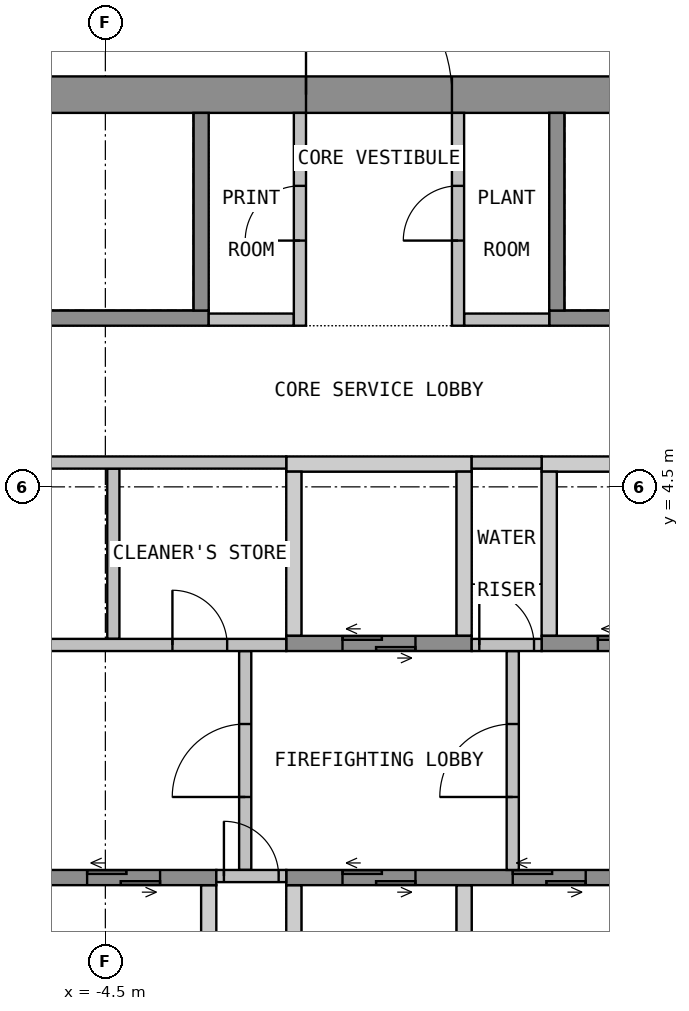
"""IFC4 building model, lengths in metres.
Left out: names, types, materials, properties, quantities, classifications, styles, units other than length and angle.
Written with IfcOpenShell. Run it as: python <this file> out.ifc"""

import sys

from ifc_helpers import new_model, si_unit, direction, frame, frame_2d, origin, place, context, subcontext, project, spatial, polyline, rectangle, outline, extrude, element, fill, save


model = new_model("IFC4")
c1 = context("Model", 3, precision=1e-05, world=origin(), true_north=direction((0.0, 1.0)))
c2 = subcontext(c1, "Body", "Model", "MODEL_VIEW")
j1 = project(units=[si_unit("LENGTHUNIT", "METRE"), si_unit("PLANEANGLEUNIT", "RADIAN")], contexts=[c1])
p1 = place(None, origin())
s1 = spatial("IfcSite", under=j1, at=p1, CompositionType="ELEMENT")
p2 = place(p1, origin())
s2 = spatial("IfcBuilding", under=s1, at=p2, CompositionType="ELEMENT")
p3 = place(p2, frame((0.0, 0.0, 246.9)))
s3 = spatial("IfcBuildingStorey", under=s2, at=p3, CompositionType="ELEMENT", Elevation=246.9)
p4 = place(p3, frame((-13.5, 10.95, 0.0), z_axis=(0.0, 0.0, 1.0), x_axis=(1.0, 0.0, 0.0)))
e1 = element("IfcWall", 1, at=p4, inside=s3, PredefinedType="SHEAR", context=c2, shape_type="SweptSolid", body=[
    extrude(rectangle(XDim=27.0, YDim=0.6, at=frame_2d((13.5, 0.0))), origin(), (0.0, 0.0, 1.0), 3.575),
])
p5 = place(p4, frame((12.3, 0.0, 0.0)))
e2 = element("IfcOpeningElement", 2, at=p5, cuts=e1, PredefinedType="OPENING", context=c2, shape_type="SweptSolid", body=[
    extrude(rectangle(XDim=2.4, YDim=2.1, at=frame_2d((1.2, 1.05))), frame((0.0, 0.31, 0.0), z_axis=(0.0, -1.0, 0.0), x_axis=(1.0, 0.0, 0.0)), (0.0, 0.0, 1.0), 0.62),
])
p6 = place(p4, frame((1.05, 0.0, 0.0)))
e3 = element("IfcOpeningElement", 3, at=p6, cuts=e1, PredefinedType="OPENING", context=c2, shape_type="SweptSolid", body=[
    extrude(rectangle(XDim=1.2, YDim=2.1, at=frame_2d((0.6, 1.05))), frame((0.0, 0.31, 0.0), z_axis=(0.0, -1.0, 0.0), x_axis=(1.0, 0.0, 0.0)), (0.0, 0.0, 1.0), 0.62),
])
p7 = place(p4, frame((24.75, 0.0, 0.0)))
e4 = element("IfcOpeningElement", 4, at=p7, cuts=e1, PredefinedType="OPENING", context=c2, shape_type="SweptSolid", body=[
    extrude(rectangle(XDim=1.2, YDim=2.1, at=frame_2d((0.6, 1.05))), frame((0.0, 0.31, 0.0), z_axis=(0.0, -1.0, 0.0), x_axis=(1.0, 0.0, 0.0)), (0.0, 0.0, 1.0), 0.62),
])
p8 = place(p3, origin())
e5 = element("IfcWall", 5, at=p8, inside=s3, PredefinedType="SHEAR", context=c2, shape_type="SweptSolid", body=[
    extrude(outline(polyline([(-1.525, 4.75), (1.525, 4.75), (1.525, 5.0), (-1.525, 5.0), (-1.525, 4.75)])), origin(), (0.0, 0.0, 1.0), 3.575),
])
p9 = place(p3, origin())
e6 = element("IfcWall", 6, at=p9, inside=s3, PredefinedType="SHEAR", context=c2, shape_type="SweptSolid", body=[
    extrude(outline(polyline([(2.675, 4.75), (8.525, 4.75), (8.525, 5.0), (2.675, 5.0), (2.675, 4.75)])), origin(), (0.0, 0.0, 1.0), 3.575),
])
p10 = place(p3, origin())
e7 = element("IfcWall", 7, at=p10, inside=s3, PredefinedType="SHEAR", context=c2, shape_type="SweptSolid", body=[
    extrude(outline(polyline([(-1.525, 2.05), (-1.275, 2.05), (-1.275, 4.75), (-1.525, 4.75), (-1.525, 2.05)])), origin(), (0.0, 0.0, 1.0), 3.575),
])
p11 = place(p3, origin())
e8 = element("IfcWall", 8, at=p11, inside=s3, PredefinedType="SHEAR", context=c2, shape_type="SweptSolid", body=[
    extrude(outline(polyline([(1.275, 2.05), (1.525, 2.05), (1.525, 4.75), (1.275, 4.75), (1.275, 2.05)])), origin(), (0.0, 0.0, 1.0), 3.575),
])
p12 = place(p3, origin())
e9 = element("IfcWall", 9, at=p12, inside=s3, PredefinedType="SHEAR", context=c2, shape_type="SweptSolid", body=[
    extrude(outline(polyline([(2.675, 2.05), (2.925, 2.05), (2.925, 4.75), (2.675, 4.75), (2.675, 2.05)])), origin(), (0.0, 0.0, 1.0), 3.575),
])
p13 = place(p3, frame((-1.525, 1.925, 0.0), z_axis=(0.0, 0.0, 1.0), x_axis=(1.0, 0.0, 0.0)))
e10 = element("IfcWall", 10, at=p13, inside=s3, PredefinedType="SHEAR", context=c2, shape_type="SweptSolid", body=[
    extrude(rectangle(XDim=3.05, YDim=0.25, at=frame_2d((1.525, 0.0))), origin(), (0.0, 0.0, 1.0), 3.575),
])
p14 = place(p13, frame((0.925, 0.0, 0.0)))
e11 = element("IfcOpeningElement", 11, at=p14, cuts=e10, PredefinedType="OPENING", context=c2, shape_type="SweptSolid", body=[
    extrude(rectangle(XDim=1.2, YDim=2.1, at=frame_2d((0.6, 1.05))), frame((0.0, 0.135, 0.0), z_axis=(0.0, -1.0, 0.0), x_axis=(1.0, 0.0, 0.0)), (0.0, 0.0, 1.0), 0.27),
])
p15 = place(p3, frame((2.675, 1.925, 0.0), z_axis=(0.0, 0.0, 1.0), x_axis=(1.0, 0.0, 0.0)))
e12 = element("IfcWall", 12, at=p15, inside=s3, PredefinedType="SHEAR", context=c2, shape_type="SweptSolid", body=[
    extrude(rectangle(XDim=5.85, YDim=0.25, at=frame_2d((2.925, 0.0))), origin(), (0.0, 0.0, 1.0), 3.575),
])
p16 = place(p15, frame((0.925, 0.0, 0.0)))
e13 = element("IfcOpeningElement", 13, at=p16, cuts=e12, PredefinedType="OPENING", context=c2, shape_type="SweptSolid", body=[
    extrude(rectangle(XDim=1.2, YDim=2.1, at=frame_2d((0.6, 1.05))), frame((0.0, 0.135, 0.0), z_axis=(0.0, -1.0, 0.0), x_axis=(1.0, 0.0, 0.0)), (0.0, 0.0, 1.0), 0.27),
])
p17 = place(p15, frame((3.725, 0.0, 0.0)))
e14 = element("IfcOpeningElement", 14, at=p17, cuts=e12, PredefinedType="OPENING", context=c2, shape_type="SweptSolid", body=[
    extrude(rectangle(XDim=1.2, YDim=2.1, at=frame_2d((0.6, 1.05))), frame((0.0, 0.135, 0.0), z_axis=(0.0, -1.0, 0.0), x_axis=(1.0, 0.0, 0.0)), (0.0, 0.0, 1.0), 0.27),
])
p18 = place(p3, origin())
e15 = element("IfcWall", 15, at=p18, inside=s3, PredefinedType="SHEAR", context=c2, shape_type="SweptSolid", body=[
    extrude(outline(polyline([(-2.925, -4.75), (-2.675, -4.75), (-2.675, -2.05), (-2.925, -2.05), (-2.925, -4.75)])), origin(), (0.0, 0.0, 1.0), 3.575),
])
p19 = place(p3, origin())
e16 = element("IfcWall", 16, at=p19, inside=s3, PredefinedType="SHEAR", context=c2, shape_type="SweptSolid", body=[
    extrude(outline(polyline([(-1.525, -4.75), (-1.275, -4.75), (-1.275, -2.05), (-1.525, -2.05), (-1.525, -4.75)])), origin(), (0.0, 0.0, 1.0), 3.575),
])
p20 = place(p3, origin())
e17 = element("IfcWall", 17, at=p20, inside=s3, PredefinedType="SHEAR", context=c2, shape_type="SweptSolid", body=[
    extrude(outline(polyline([(1.275, -4.75), (1.525, -4.75), (1.525, -2.05), (1.275, -2.05), (1.275, -4.75)])), origin(), (0.0, 0.0, 1.0), 3.575),
])
p21 = place(p3, frame((-11.325, -1.925, 0.0), z_axis=(0.0, 0.0, 1.0), x_axis=(1.0, 0.0, 0.0)))
e18 = element("IfcWall", 18, at=p21, inside=s3, PredefinedType="SHEAR", context=c2, shape_type="SweptSolid", body=[
    extrude(rectangle(XDim=8.65, YDim=0.25, at=frame_2d((4.325, 0.0))), origin(), (0.0, 0.0, 1.0), 3.575),
])
p22 = place(p21, frame((0.925, 0.0, 0.0)))
e19 = element("IfcOpeningElement", 19, at=p22, cuts=e18, PredefinedType="OPENING", context=c2, shape_type="SweptSolid", body=[
    extrude(rectangle(XDim=1.2, YDim=2.1, at=frame_2d((0.6, 1.05))), frame((0.0, 0.135, 0.0), z_axis=(0.0, -1.0, 0.0), x_axis=(1.0, 0.0, 0.0)), (0.0, 0.0, 1.0), 0.27),
])
p23 = place(p21, frame((3.725, 0.0, 0.0)))
e20 = element("IfcOpeningElement", 20, at=p23, cuts=e18, PredefinedType="OPENING", context=c2, shape_type="SweptSolid", body=[
    extrude(rectangle(XDim=1.2, YDim=2.1, at=frame_2d((0.6, 1.05))), frame((0.0, 0.135, 0.0), z_axis=(0.0, -1.0, 0.0), x_axis=(1.0, 0.0, 0.0)), (0.0, 0.0, 1.0), 0.27),
])
p24 = place(p21, frame((6.525, 0.0, 0.0)))
e21 = element("IfcOpeningElement", 21, at=p24, cuts=e18, PredefinedType="OPENING", context=c2, shape_type="SweptSolid", body=[
    extrude(rectangle(XDim=1.2, YDim=2.1, at=frame_2d((0.6, 1.05))), frame((0.0, 0.135, 0.0), z_axis=(0.0, -1.0, 0.0), x_axis=(1.0, 0.0, 0.0)), (0.0, 0.0, 1.0), 0.27),
])
p25 = place(p3, frame((-1.525, -1.925, 0.0), z_axis=(0.0, 0.0, 1.0), x_axis=(1.0, 0.0, 0.0)))
e22 = element("IfcWall", 22, at=p25, inside=s3, PredefinedType="SHEAR", context=c2, shape_type="SweptSolid", body=[
    extrude(rectangle(XDim=5.85, YDim=0.25, at=frame_2d((2.925, 0.0))), origin(), (0.0, 0.0, 1.0), 3.575),
])
p26 = place(p25, frame((0.925, 0.0, 0.0)))
e23 = element("IfcOpeningElement", 23, at=p26, cuts=e22, PredefinedType="OPENING", context=c2, shape_type="SweptSolid", body=[
    extrude(rectangle(XDim=1.2, YDim=2.1, at=frame_2d((0.6, 1.05))), frame((0.0, 0.135, 0.0), z_axis=(0.0, -1.0, 0.0), x_axis=(1.0, 0.0, 0.0)), (0.0, 0.0, 1.0), 0.27),
])
p27 = place(p25, frame((3.725, 0.0, 0.0)))
e24 = element("IfcOpeningElement", 24, at=p27, cuts=e22, PredefinedType="OPENING", context=c2, shape_type="SweptSolid", body=[
    extrude(rectangle(XDim=1.2, YDim=2.1, at=frame_2d((0.6, 1.05))), frame((0.0, 0.135, 0.0), z_axis=(0.0, -1.0, 0.0), x_axis=(1.0, 0.0, 0.0)), (0.0, 0.0, 1.0), 0.27),
])
p28 = place(p3, frame((-2.2, -1.8, 0.0), z_axis=(0.0, 0.0, 1.0), x_axis=(0.0, 1.0, 0.0)))
e25 = element("IfcWall", 25, at=p28, inside=s3, PredefinedType="PARTITIONING", context=c2, shape_type="SweptSolid", body=[
    extrude(rectangle(XDim=3.6, YDim=0.2, at=frame_2d((1.8, 0.0))), origin(), (0.0, 0.0, 1.0), 3.575),
])
p29 = place(p28, frame((1.2, 0.0, 0.0)))
e26 = element("IfcOpeningElement", 26, at=p29, cuts=e25, PredefinedType="OPENING", context=c2, shape_type="SweptSolid", body=[
    extrude(rectangle(XDim=1.2, YDim=2.1, at=frame_2d((0.6, 1.05))), frame((0.0, 0.11, 0.0), z_axis=(0.0, -1.0, 0.0), x_axis=(1.0, 0.0, 0.0)), (0.0, 0.0, 1.0), 0.22),
])
p30 = place(p3, frame((2.2, -1.8, 0.0), z_axis=(0.0, 0.0, 1.0), x_axis=(0.0, 1.0, 0.0)))
e27 = element("IfcWall", 27, at=p30, inside=s3, PredefinedType="PARTITIONING", context=c2, shape_type="SweptSolid", body=[
    extrude(rectangle(XDim=3.6, YDim=0.2, at=frame_2d((1.8, 0.0))), origin(), (0.0, 0.0, 1.0), 3.575),
])
p31 = place(p30, frame((1.2, 0.0, 0.0)))
e28 = element("IfcOpeningElement", 28, at=p31, cuts=e27, PredefinedType="OPENING", context=c2, shape_type="SweptSolid", body=[
    extrude(rectangle(XDim=1.2, YDim=2.1, at=frame_2d((0.6, 1.05))), frame((0.0, 0.11, 0.0), z_axis=(0.0, -1.0, 0.0), x_axis=(1.0, 0.0, 0.0)), (0.0, 0.0, 1.0), 0.22),
])
p32 = place(p3, frame((-12.9, 7.275, 0.0), z_axis=(0.0, 0.0, 1.0), x_axis=(1.0, 0.0, 0.0)))
e29 = element("IfcWall", 29, at=p32, inside=s3, PredefinedType="SHEAR", context=c2, shape_type="SweptSolid", body=[
    extrude(rectangle(XDim=10.1, YDim=0.25, at=frame_2d((5.05, 0.0))), origin(), (0.0, 0.0, 1.0), 3.575),
])
p33 = place(p32, frame((0.45, 0.0, 0.0)))
e30 = element("IfcOpeningElement", 30, at=p33, cuts=e29, PredefinedType="OPENING", context=c2, shape_type="SweptSolid", body=[
    extrude(rectangle(XDim=1.2, YDim=2.1, at=frame_2d((0.6, 1.05))), frame((0.0, 0.135, 0.0), z_axis=(0.0, -1.0, 0.0), x_axis=(1.0, 0.0, 0.0)), (0.0, 0.0, 1.0), 0.27),
])
p34 = place(p3, frame((-2.925, 7.4, 0.0), z_axis=(0.0, 0.0, 1.0), x_axis=(0.0, 1.0, 0.0)))
e31 = element("IfcWall", 31, at=p34, inside=s3, PredefinedType="SHEAR", context=c2, shape_type="SweptSolid", body=[
    extrude(rectangle(XDim=3.25, YDim=0.25, at=frame_2d((1.625, 0.0))), origin(), (0.0, 0.0, 1.0), 3.575),
])
p35 = place(p3, frame((2.8, 7.275, 0.0), z_axis=(0.0, 0.0, 1.0), x_axis=(1.0, 0.0, 0.0)))
e32 = element("IfcWall", 32, at=p35, inside=s3, PredefinedType="SHEAR", context=c2, shape_type="SweptSolid", body=[
    extrude(rectangle(XDim=10.1, YDim=0.25, at=frame_2d((5.05, 0.0))), origin(), (0.0, 0.0, 1.0), 3.575),
])
p36 = place(p35, frame((8.45, 0.0, 0.0)))
e33 = element("IfcOpeningElement", 33, at=p36, cuts=e32, PredefinedType="OPENING", context=c2, shape_type="SweptSolid", body=[
    extrude(rectangle(XDim=1.2, YDim=2.1, at=frame_2d((0.6, 1.05))), frame((0.0, 0.135, 0.0), z_axis=(0.0, -1.0, 0.0), x_axis=(1.0, 0.0, 0.0)), (0.0, 0.0, 1.0), 0.27),
])
p37 = place(p3, frame((2.925, 7.4, 0.0), z_axis=(0.0, 0.0, 1.0), x_axis=(0.0, 1.0, 0.0)))
e34 = element("IfcWall", 34, at=p37, inside=s3, PredefinedType="SHEAR", context=c2, shape_type="SweptSolid", body=[
    extrude(rectangle(XDim=3.25, YDim=0.25, at=frame_2d((1.625, 0.0))), origin(), (0.0, 0.0, 1.0), 3.575),
])
for number, where, z_axis, x_axis in (
    (35, (-2.8, 7.25, 0.0), (0.0, 0.0, 1.0), (1.0, 0.0, 0.0)),
    (36, (1.4, 7.25, 0.0), (0.0, 0.0, 1.0), (1.0, 0.0, 0.0)),
):
    element("IfcWall", number, at=place(p3, frame(where, z_axis=z_axis, x_axis=x_axis)), inside=s3, PredefinedType="PARTITIONING", context=c2, shape_type="SweptSolid", body=[
        extrude(rectangle(XDim=1.4, YDim=0.2, at=frame_2d((0.7, 0.0))), origin(), (0.0, 0.0, 1.0), 3.575),
    ])
p38 = place(p3, frame((-1.3, 7.15, 0.0), z_axis=(0.0, 0.0, 1.0), x_axis=(0.0, 1.0, 0.0)))
e37 = element("IfcWall", 37, at=p38, inside=s3, PredefinedType="PARTITIONING", context=c2, shape_type="SweptSolid", body=[
    extrude(rectangle(XDim=3.5, YDim=0.2, at=frame_2d((1.75, 0.0))), origin(), (0.0, 0.0, 1.0), 3.575),
])
p39 = place(p38, frame((1.4, 0.0, 0.0)))
e38 = element("IfcOpeningElement", 38, at=p39, cuts=e37, PredefinedType="OPENING", context=c2, shape_type="SweptSolid", body=[
    extrude(rectangle(XDim=0.9, YDim=2.1, at=frame_2d((0.45, 1.05))), frame((0.0, 0.11, 0.0), z_axis=(0.0, -1.0, 0.0), x_axis=(1.0, 0.0, 0.0)), (0.0, 0.0, 1.0), 0.22),
])
p40 = place(p3, frame((1.3, 7.15, 0.0), z_axis=(0.0, 0.0, 1.0), x_axis=(0.0, 1.0, 0.0)))
e39 = element("IfcWall", 39, at=p40, inside=s3, PredefinedType="PARTITIONING", context=c2, shape_type="SweptSolid", body=[
    extrude(rectangle(XDim=3.5, YDim=0.2, at=frame_2d((1.75, 0.0))), origin(), (0.0, 0.0, 1.0), 3.575),
])
p41 = place(p40, frame((1.4, 0.0, 0.0)))
e40 = element("IfcOpeningElement", 40, at=p41, cuts=e39, PredefinedType="OPENING", context=c2, shape_type="SweptSolid", body=[
    extrude(rectangle(XDim=0.9, YDim=2.1, at=frame_2d((0.45, 1.05))), frame((0.0, 0.11, 0.0), z_axis=(0.0, -1.0, 0.0), x_axis=(1.0, 0.0, 0.0)), (0.0, 0.0, 1.0), 0.22),
])
p42 = place(p3, frame((-4.369, 2.0, 0.0), z_axis=(0.0, 0.0, 1.0), x_axis=(0.0, 1.0, 0.0)))
e41 = element("IfcWall", 41, at=p42, inside=s3, PredefinedType="PARTITIONING", context=c2, shape_type="SweptSolid", body=[
    extrude(rectangle(XDim=2.8, YDim=0.2, at=frame_2d((1.4, 0.0))), origin(), (0.0, 0.0, 1.0), 3.575),
])
p43 = place(p3, frame((-12.9, 1.9, 0.0), z_axis=(0.0, 0.0, 1.0), x_axis=(1.0, 0.0, 0.0)))
e42 = element("IfcWall", 42, at=p43, inside=s3, PredefinedType="PARTITIONING", context=c2, shape_type="SweptSolid", body=[
    extrude(rectangle(XDim=11.375, YDim=0.2, at=frame_2d((5.688, 0.0))), origin(), (0.0, 0.0, 1.0), 3.575),
])
p44 = place(p43, frame((0.972, 0.0, 0.0)))
e43 = element("IfcOpeningElement", 43, at=p44, cuts=e42, PredefinedType="OPENING", context=c2, shape_type="SweptSolid", body=[
    extrude(rectangle(XDim=0.9, YDim=2.1, at=frame_2d((0.45, 1.05))), frame((0.0, 0.11, 0.0), z_axis=(0.0, -1.0, 0.0), x_axis=(1.0, 0.0, 0.0)), (0.0, 0.0, 1.0), 0.22),
])
p45 = place(p43, frame((5.087, 0.0, 0.0)))
e44 = element("IfcOpeningElement", 44, at=p45, cuts=e42, PredefinedType="OPENING", context=c2, shape_type="SweptSolid", body=[
    extrude(rectangle(XDim=1.2, YDim=2.1, at=frame_2d((0.6, 1.05))), frame((0.0, 0.11, 0.0), z_axis=(0.0, -1.0, 0.0), x_axis=(1.0, 0.0, 0.0)), (0.0, 0.0, 1.0), 0.22),
])
p46 = place(p43, frame((9.503, 0.0, 0.0)))
e45 = element("IfcOpeningElement", 45, at=p46, cuts=e42, PredefinedType="OPENING", context=c2, shape_type="SweptSolid", body=[
    extrude(rectangle(XDim=0.9, YDim=2.1, at=frame_2d((0.45, 1.05))), frame((0.0, 0.11, 0.0), z_axis=(0.0, -1.0, 0.0), x_axis=(1.0, 0.0, 0.0)), (0.0, 0.0, 1.0), 0.22),
])
p47 = place(p3, frame((-12.9, 4.9, 0.0), z_axis=(0.0, 0.0, 1.0), x_axis=(1.0, 0.0, 0.0)))
e46 = element("IfcWall", 46, at=p47, inside=s3, PredefinedType="PARTITIONING", context=c2, shape_type="SweptSolid", body=[
    extrude(rectangle(XDim=11.375, YDim=0.2, at=frame_2d((5.688, 0.0))), origin(), (0.0, 0.0, 1.0), 3.575),
])
p48 = place(p3, frame((1.525, 1.9, 0.0), z_axis=(0.0, 0.0, 1.0), x_axis=(1.0, 0.0, 0.0)))
e47 = element("IfcWall", 47, at=p48, inside=s3, PredefinedType="PARTITIONING", context=c2, shape_type="SweptSolid", body=[
    extrude(rectangle(XDim=1.15, YDim=0.2, at=frame_2d((0.575, 0.0))), origin(), (0.0, 0.0, 1.0), 3.575),
])
p49 = place(p48, frame((0.125, 0.0, 0.0)))
e48 = element("IfcOpeningElement", 48, at=p49, cuts=e47, PredefinedType="OPENING", context=c2, shape_type="SweptSolid", body=[
    extrude(rectangle(XDim=0.9, YDim=2.1, at=frame_2d((0.45, 1.05))), frame((0.0, 0.11, 0.0), z_axis=(0.0, -1.0, 0.0), x_axis=(1.0, 0.0, 0.0)), (0.0, 0.0, 1.0), 0.22),
])
p50 = place(p3, frame((1.525, 4.9, 0.0), z_axis=(0.0, 0.0, 1.0), x_axis=(1.0, 0.0, 0.0)))
e49 = element("IfcWall", 49, at=p50, inside=s3, PredefinedType="PARTITIONING", context=c2, shape_type="SweptSolid", body=[
    extrude(rectangle(XDim=1.15, YDim=0.2, at=frame_2d((0.575, 0.0))), origin(), (0.0, 0.0, 1.0), 3.575),
])
p51 = place(p3, frame((-2.675, -1.9, 0.0), z_axis=(0.0, 0.0, 1.0), x_axis=(1.0, 0.0, 0.0)))
e50 = element("IfcWall", 50, at=p51, inside=s3, PredefinedType="PARTITIONING", context=c2, shape_type="SweptSolid", body=[
    extrude(rectangle(XDim=1.15, YDim=0.2, at=frame_2d((0.575, 0.0))), origin(), (0.0, 0.0, 1.0), 3.575),
])
p52 = place(p51, frame((0.125, 0.0, 0.0)))
e51 = element("IfcOpeningElement", 51, at=p52, cuts=e50, PredefinedType="OPENING", context=c2, shape_type="SweptSolid", body=[
    extrude(rectangle(XDim=0.9, YDim=2.1, at=frame_2d((0.45, 1.05))), frame((0.0, 0.11, 0.0), z_axis=(0.0, -1.0, 0.0), x_axis=(1.0, 0.0, 0.0)), (0.0, 0.0, 1.0), 0.22),
])
p53 = place(p5, origin())
e52 = element("IfcDoor", 52, at=p53, inside=s3, OperationType="DOUBLE_DOOR_DOUBLE_SWING", PredefinedType="DOOR", context=c2, shape_type="SweptSolid", body=[
    extrude(rectangle(XDim=2.4, YDim=2.1, at=frame_2d((1.2, 1.05))), frame((0.0, 0.025, 0.0), z_axis=(0.0, -1.0, 0.0), x_axis=(1.0, 0.0, 0.0)), (0.0, 0.0, 1.0), 0.05),
])
fill(e2, e52)
p54 = place(p14, origin())
e53 = element("IfcDoor", 53, at=p54, inside=s3, OperationType="DOUBLE_DOOR_SLIDING", PredefinedType="DOOR", context=c2, shape_type="SweptSolid", body=[
    extrude(rectangle(XDim=1.2, YDim=2.1, at=frame_2d((0.6, 1.05))), frame((0.0, 0.025, 0.0), z_axis=(0.0, -1.0, 0.0), x_axis=(1.0, 0.0, 0.0)), (0.0, 0.0, 1.0), 0.05),
])
fill(e11, e53)
p55 = place(p16, origin())
e54 = element("IfcDoor", 54, at=p55, inside=s3, OperationType="DOUBLE_DOOR_SLIDING", PredefinedType="DOOR", context=c2, shape_type="SweptSolid", body=[
    extrude(rectangle(XDim=1.2, YDim=2.1, at=frame_2d((0.6, 1.05))), frame((0.0, 0.025, 0.0), z_axis=(0.0, -1.0, 0.0), x_axis=(1.0, 0.0, 0.0)), (0.0, 0.0, 1.0), 0.05),
])
fill(e13, e54)
p56 = place(p24, origin())
e55 = element("IfcDoor", 55, at=p56, inside=s3, OperationType="DOUBLE_DOOR_SLIDING", PredefinedType="DOOR", context=c2, shape_type="SweptSolid", body=[
    extrude(rectangle(XDim=1.2, YDim=2.1, at=frame_2d((0.6, 1.05))), frame((0.0, 0.025, 0.0), z_axis=(0.0, -1.0, 0.0), x_axis=(1.0, 0.0, 0.0)), (0.0, 0.0, 1.0), 0.05),
])
fill(e21, e55)
p57 = place(p26, origin())
e56 = element("IfcDoor", 56, at=p57, inside=s3, OperationType="DOUBLE_DOOR_SLIDING", PredefinedType="DOOR", context=c2, shape_type="SweptSolid", body=[
    extrude(rectangle(XDim=1.2, YDim=2.1, at=frame_2d((0.6, 1.05))), frame((0.0, 0.025, 0.0), z_axis=(0.0, -1.0, 0.0), x_axis=(1.0, 0.0, 0.0)), (0.0, 0.0, 1.0), 0.05),
])
fill(e23, e56)
p58 = place(p27, origin())
e57 = element("IfcDoor", 57, at=p58, inside=s3, OperationType="DOUBLE_DOOR_SLIDING", PredefinedType="DOOR", context=c2, shape_type="SweptSolid", body=[
    extrude(rectangle(XDim=1.2, YDim=2.1, at=frame_2d((0.6, 1.05))), frame((0.0, 0.025, 0.0), z_axis=(0.0, -1.0, 0.0), x_axis=(1.0, 0.0, 0.0)), (0.0, 0.0, 1.0), 0.05),
])
fill(e24, e57)
p59 = place(p29, origin())
e58 = element("IfcDoor", 58, at=p59, inside=s3, OperationType="SINGLE_SWING_LEFT", PredefinedType="DOOR", context=c2, shape_type="SweptSolid", body=[
    extrude(rectangle(XDim=1.2, YDim=2.1, at=frame_2d((0.6, 1.05))), frame((0.0, 0.025, 0.0), z_axis=(0.0, -1.0, 0.0), x_axis=(1.0, 0.0, 0.0)), (0.0, 0.0, 1.0), 0.05),
])
fill(e26, e58)
p60 = place(p31, origin())
e59 = element("IfcDoor", 59, at=p60, inside=s3, OperationType="SINGLE_SWING_LEFT", PredefinedType="DOOR", context=c2, shape_type="SweptSolid", body=[
    extrude(rectangle(XDim=1.2, YDim=2.1, at=frame_2d((0.6, 1.05))), frame((0.0, 0.025, 0.0), z_axis=(0.0, -1.0, 0.0), x_axis=(1.0, 0.0, 0.0)), (0.0, 0.0, 1.0), 0.05),
])
fill(e28, e59)
p61 = place(p39, origin())
e60 = element("IfcDoor", 60, at=p61, inside=s3, OperationType="SINGLE_SWING_LEFT", PredefinedType="DOOR", context=c2, shape_type="SweptSolid", body=[
    extrude(rectangle(XDim=0.9, YDim=2.1, at=frame_2d((0.45, 1.05))), frame((0.0, 0.025, 0.0), z_axis=(0.0, -1.0, 0.0), x_axis=(1.0, 0.0, 0.0)), (0.0, 0.0, 1.0), 0.05),
])
fill(e38, e60)
p62 = place(p41, origin())
e61 = element("IfcDoor", 61, at=p62, inside=s3, OperationType="SINGLE_SWING_LEFT", PredefinedType="DOOR", context=c2, shape_type="SweptSolid", body=[
    extrude(rectangle(XDim=0.9, YDim=2.1, at=frame_2d((0.45, 1.05))), frame((0.0, 0.025, 0.0), z_axis=(0.0, -1.0, 0.0), x_axis=(1.0, 0.0, 0.0)), (0.0, 0.0, 1.0), 0.05),
])
fill(e40, e61)
p63 = place(p46, origin())
e62 = element("IfcDoor", 62, at=p63, inside=s3, OperationType="SINGLE_SWING_LEFT", PredefinedType="DOOR", context=c2, shape_type="SweptSolid", body=[
    extrude(rectangle(XDim=0.9, YDim=2.1, at=frame_2d((0.45, 1.05))), frame((0.0, 0.025, 0.0), z_axis=(0.0, -1.0, 0.0), x_axis=(1.0, 0.0, 0.0)), (0.0, 0.0, 1.0), 0.05),
])
fill(e45, e62)
p64 = place(p49, origin())
e63 = element("IfcDoor", 63, at=p64, inside=s3, OperationType="SINGLE_SWING_LEFT", PredefinedType="DOOR", context=c2, shape_type="SweptSolid", body=[
    extrude(rectangle(XDim=0.9, YDim=2.1, at=frame_2d((0.45, 1.05))), frame((0.0, 0.025, 0.0), z_axis=(0.0, -1.0, 0.0), x_axis=(1.0, 0.0, 0.0)), (0.0, 0.0, 1.0), 0.05),
])
fill(e48, e63)
p65 = place(p52, origin())
e64 = element("IfcDoor", 64, at=p65, inside=s3, OperationType="SINGLE_SWING_LEFT", PredefinedType="DOOR", context=c2, shape_type="SweptSolid", body=[
    extrude(rectangle(XDim=0.9, YDim=2.1, at=frame_2d((0.45, 1.05))), frame((0.0, 0.025, 0.0), z_axis=(0.0, -1.0, 0.0), x_axis=(1.0, 0.0, 0.0)), (0.0, 0.0, 1.0), 0.05),
])
fill(e51, e64)
save(model, sys.argv[1])
